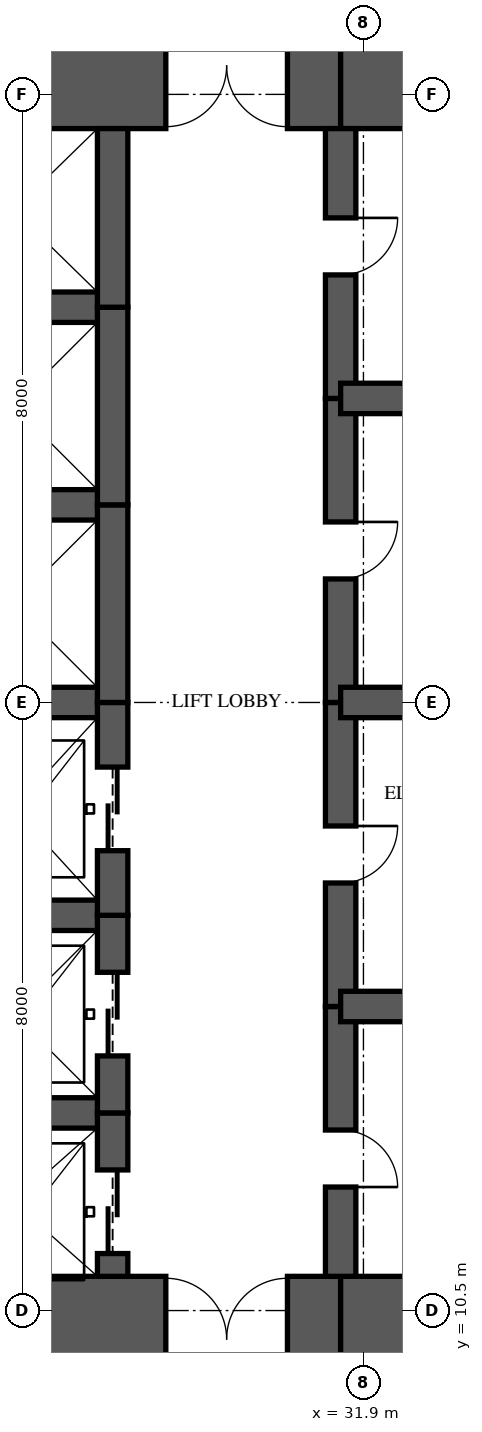
"""IFC4 building model, lengths in metres.
Left out: names, types, materials, properties, quantities, classifications, styles, units other than length and angle.
Written with IfcOpenShell. Run it as: python <this file> out.ifc"""

import sys

from ifc_helpers import new_model, si_unit, direction, frame, frame_2d, origin, place, context, subcontext, project, spatial, rectangle, extrude, element, fill, save


model = new_model("IFC4")
c1 = context("Model", 3, precision=1e-05, world=origin(), true_north=direction((0.0, 1.0)))
c2 = subcontext(c1, "Body", "Model", "MODEL_VIEW")
j1 = project(units=[si_unit("LENGTHUNIT", "METRE"), si_unit("PLANEANGLEUNIT", "RADIAN")], contexts=[c1])
p1 = place(None, origin())
s1 = spatial("IfcSite", under=j1, at=p1, CompositionType="ELEMENT")
p2 = place(p1, origin())
s2 = spatial("IfcBuilding", under=s1, at=p2, CompositionType="ELEMENT")
p3 = place(p2, frame((0.0, 0.0, 34.4)))
s3 = spatial("IfcBuildingStorey", under=s2, at=p3, CompositionType="ELEMENT", Elevation=34.4)
p4 = place(p3, frame((26.0, 10.125, 0.0), z_axis=(0.0, 0.0, 1.0), x_axis=(1.0, 0.0, 0.0)))
e1 = element("IfcWall", 1, at=p4, inside=s3, PredefinedType="SHEAR", context=c2, shape_type="SweptSolid", body=[
    extrude(rectangle(XDim=5.6, YDim=1.65, at=frame_2d((2.8, 0.0))), origin(), (0.0, 0.0, 1.0), 3.35),
])
p5 = place(p4, frame((3.3, 0.0, 0.0)))
e2 = element("IfcOpeningElement", 2, at=p5, cuts=e1, PredefinedType="OPENING", context=c2, shape_type="SweptSolid", body=[
    extrude(rectangle(XDim=1.6, YDim=2.1, at=frame_2d((0.8, 1.05))), frame((0.0, 0.835, 0.0), z_axis=(0.0, -1.0, 0.0), x_axis=(1.0, 0.0, 0.0)), (0.0, 0.0, 1.0), 1.67),
])
for number, where, z_axis, x_axis in (
    (3, (31.6, 10.125, 0.0), (0.0, 0.0, 1.0), (1.0, 0.0, 0.0)),
    (4, (35.9, 26.875, 0.0), (0.0, 0.0, 1.0), (-1.0, 0.0, 0.0)),
):
    element("IfcWall", number, at=place(p3, frame(where, z_axis=z_axis, x_axis=x_axis)), inside=s3, PredefinedType="SHEAR", context=c2, shape_type="SweptSolid", body=[
        extrude(rectangle(XDim=4.3, YDim=1.65, at=frame_2d((2.15, 0.0))), origin(), (0.0, 0.0, 1.0), 3.35),
    ])
p6 = place(p3, frame((31.6, 26.875, 0.0), z_axis=(0.0, 0.0, 1.0), x_axis=(-1.0, 0.0, 0.0)))
e5 = element("IfcWall", 5, at=p6, inside=s3, PredefinedType="SHEAR", context=c2, shape_type="SweptSolid", body=[
    extrude(rectangle(XDim=5.6, YDim=1.65, at=frame_2d((2.8, 0.0))), origin(), (0.0, 0.0, 1.0), 3.35),
])
p7 = place(p6, frame((0.7, 0.0, 0.0)))
e6 = element("IfcOpeningElement", 6, at=p7, cuts=e5, PredefinedType="OPENING", context=c2, shape_type="SweptSolid", body=[
    extrude(rectangle(XDim=1.6, YDim=2.1, at=frame_2d((0.8, 1.05))), frame((0.0, 0.835, 0.0), z_axis=(0.0, -1.0, 0.0), x_axis=(1.0, 0.0, 0.0)), (0.0, 0.0, 1.0), 1.67),
])
p8 = place(p3, frame((28.6, 10.95, 0.0), z_axis=(0.0, 0.0, 1.0), x_axis=(0.0, 1.0, 0.0)))
e7 = element("IfcWall", 7, at=p8, inside=s3, PredefinedType="SHEAR", context=c2, shape_type="SweptSolid", body=[
    extrude(rectangle(XDim=2.15, YDim=0.4, at=frame_2d((1.075, 0.0))), origin(), (0.0, 0.0, 1.0), 3.35),
])
p9 = place(p8, frame((0.3, 0.0, 0.0)))
e8 = element("IfcOpeningElement", 8, at=p9, cuts=e7, PredefinedType="OPENING", context=c2, shape_type="SweptSolid", body=[
    extrude(rectangle(XDim=1.1, YDim=2.1, at=frame_2d((0.55, 1.05))), frame((0.0, 0.21, 0.0), z_axis=(0.0, -1.0, 0.0), x_axis=(1.0, 0.0, 0.0)), (0.0, 0.0, 1.0), 0.42),
])
p10 = place(p3, frame((28.6, 13.1, 0.0), z_axis=(0.0, 0.0, 1.0), x_axis=(0.0, 1.0, 0.0)))
e9 = element("IfcWall", 9, at=p10, inside=s3, PredefinedType="SHEAR", context=c2, shape_type="SweptSolid", body=[
    extrude(rectangle(XDim=2.6, YDim=0.4, at=frame_2d((1.3, 0.0))), origin(), (0.0, 0.0, 1.0), 3.35),
])
p11 = place(p10, frame((0.75, 0.0, 0.0)))
e10 = element("IfcOpeningElement", 10, at=p11, cuts=e9, PredefinedType="OPENING", context=c2, shape_type="SweptSolid", body=[
    extrude(rectangle(XDim=1.1, YDim=2.1, at=frame_2d((0.55, 1.05))), frame((0.0, 0.21, 0.0), z_axis=(0.0, -1.0, 0.0), x_axis=(1.0, 0.0, 0.0)), (0.0, 0.0, 1.0), 0.42),
])
p12 = place(p3, frame((28.6, 15.7, 0.0), z_axis=(0.0, 0.0, 1.0), x_axis=(0.0, 1.0, 0.0)))
e11 = element("IfcWall", 11, at=p12, inside=s3, PredefinedType="SHEAR", context=c2, shape_type="SweptSolid", body=[
    extrude(rectangle(XDim=2.8, YDim=0.4, at=frame_2d((1.4, 0.0))), origin(), (0.0, 0.0, 1.0), 3.35),
])
p13 = place(p12, frame((0.85, 0.0, 0.0)))
e12 = element("IfcOpeningElement", 12, at=p13, cuts=e11, PredefinedType="OPENING", context=c2, shape_type="SweptSolid", body=[
    extrude(rectangle(XDim=1.1, YDim=2.1, at=frame_2d((0.55, 1.05))), frame((0.0, 0.21, 0.0), z_axis=(0.0, -1.0, 0.0), x_axis=(1.0, 0.0, 0.0)), (0.0, 0.0, 1.0), 0.42),
])
p14 = place(p3, frame((28.6, 18.5, 0.0), z_axis=(0.0, 0.0, 1.0), x_axis=(0.0, 1.0, 0.0)))
e13 = element("IfcWall", 13, at=p14, inside=s3, PredefinedType="SHEAR", context=c2, shape_type="SweptSolid", body=[
    extrude(rectangle(XDim=2.6, YDim=0.4, at=frame_2d((1.3, 0.0))), origin(), (0.0, 0.0, 1.0), 3.35),
])
p15 = place(p3, frame((28.6, 21.1, 0.0), z_axis=(0.0, 0.0, 1.0), x_axis=(0.0, 1.0, 0.0)))
e14 = element("IfcWall", 14, at=p15, inside=s3, PredefinedType="SHEAR", context=c2, shape_type="SweptSolid", body=[
    extrude(rectangle(XDim=2.6, YDim=0.4, at=frame_2d((1.3, 0.0))), origin(), (0.0, 0.0, 1.0), 3.35),
])
p16 = place(p3, frame((28.6, 23.7, 0.0), z_axis=(0.0, 0.0, 1.0), x_axis=(0.0, 1.0, 0.0)))
e15 = element("IfcWall", 15, at=p16, inside=s3, PredefinedType="SHEAR", context=c2, shape_type="SweptSolid", body=[
    extrude(rectangle(XDim=2.35, YDim=0.4, at=frame_2d((1.175, 0.0))), origin(), (0.0, 0.0, 1.0), 3.35),
])
p17 = place(p3, frame((31.6, 10.95, 0.0), z_axis=(0.0, 0.0, 1.0), x_axis=(0.0, 1.0, 0.0)))
e16 = element("IfcWall", 16, at=p17, inside=s3, PredefinedType="SHEAR", context=c2, shape_type="SweptSolid", body=[
    extrude(rectangle(XDim=3.55, YDim=0.4, at=frame_2d((1.775, 0.0))), origin(), (0.0, 0.0, 1.0), 3.35),
])
p18 = place(p17, frame((1.175, 0.0, 0.0)))
e17 = element("IfcOpeningElement", 17, at=p18, cuts=e16, PredefinedType="OPENING", context=c2, shape_type="SweptSolid", body=[
    extrude(rectangle(XDim=0.75, YDim=2.1, at=frame_2d((0.375, 1.05))), frame((0.0, 0.21, 0.0), z_axis=(0.0, -1.0, 0.0), x_axis=(1.0, 0.0, 0.0)), (0.0, 0.0, 1.0), 0.42),
])
p19 = place(p3, frame((31.6, 14.5, 0.0), z_axis=(0.0, 0.0, 1.0), x_axis=(0.0, 1.0, 0.0)))
e18 = element("IfcWall", 18, at=p19, inside=s3, PredefinedType="SHEAR", context=c2, shape_type="SweptSolid", body=[
    extrude(rectangle(XDim=4.0, YDim=0.4, at=frame_2d((2.0, 0.0))), origin(), (0.0, 0.0, 1.0), 3.35),
])
p20 = place(p19, frame((1.625, 0.0, 0.0)))
e19 = element("IfcOpeningElement", 19, at=p20, cuts=e18, PredefinedType="OPENING", context=c2, shape_type="SweptSolid", body=[
    extrude(rectangle(XDim=0.75, YDim=2.1, at=frame_2d((0.375, 1.05))), frame((0.0, 0.21, 0.0), z_axis=(0.0, -1.0, 0.0), x_axis=(1.0, 0.0, 0.0)), (0.0, 0.0, 1.0), 0.42),
])
p21 = place(p3, frame((31.6, 18.5, 0.0), z_axis=(0.0, 0.0, 1.0), x_axis=(0.0, 1.0, 0.0)))
e20 = element("IfcWall", 20, at=p21, inside=s3, PredefinedType="SHEAR", context=c2, shape_type="SweptSolid", body=[
    extrude(rectangle(XDim=4.0, YDim=0.4, at=frame_2d((2.0, 0.0))), origin(), (0.0, 0.0, 1.0), 3.35),
])
p22 = place(p21, frame((1.625, 0.0, 0.0)))
e21 = element("IfcOpeningElement", 21, at=p22, cuts=e20, PredefinedType="OPENING", context=c2, shape_type="SweptSolid", body=[
    extrude(rectangle(XDim=0.75, YDim=2.1, at=frame_2d((0.375, 1.05))), frame((0.0, 0.21, 0.0), z_axis=(0.0, -1.0, 0.0), x_axis=(1.0, 0.0, 0.0)), (0.0, 0.0, 1.0), 0.42),
])
p23 = place(p3, frame((31.6, 22.5, 0.0), z_axis=(0.0, 0.0, 1.0), x_axis=(0.0, 1.0, 0.0)))
e22 = element("IfcWall", 22, at=p23, inside=s3, PredefinedType="SHEAR", context=c2, shape_type="SweptSolid", body=[
    extrude(rectangle(XDim=3.55, YDim=0.4, at=frame_2d((1.775, 0.0))), origin(), (0.0, 0.0, 1.0), 3.35),
])
p24 = place(p23, frame((1.625, 0.0, 0.0)))
e23 = element("IfcOpeningElement", 23, at=p24, cuts=e22, PredefinedType="OPENING", context=c2, shape_type="SweptSolid", body=[
    extrude(rectangle(XDim=0.75, YDim=2.1, at=frame_2d((0.375, 1.05))), frame((0.0, 0.21, 0.0), z_axis=(0.0, -1.0, 0.0), x_axis=(1.0, 0.0, 0.0)), (0.0, 0.0, 1.0), 0.42),
])
for number, where, z_axis, x_axis in (
    (24, (26.0, 13.1, 0.0), (0.0, 0.0, 1.0), (1.0, 0.0, 0.0)),
    (25, (26.0, 15.7, 0.0), (0.0, 0.0, 1.0), (1.0, 0.0, 0.0)),
    (26, (26.0, 18.5, 0.0), (0.0, 0.0, 1.0), (1.0, 0.0, 0.0)),
    (27, (26.0, 21.1, 0.0), (0.0, 0.0, 1.0), (1.0, 0.0, 0.0)),
    (28, (26.0, 23.7, 0.0), (0.0, 0.0, 1.0), (1.0, 0.0, 0.0)),
):
    element("IfcWall", number, at=place(p3, frame(where, z_axis=z_axis, x_axis=x_axis)), inside=s3, PredefinedType="SHEAR", context=c2, shape_type="SweptSolid", body=[
        extrude(rectangle(XDim=2.6, YDim=0.4, at=frame_2d((1.3, 0.0))), origin(), (0.0, 0.0, 1.0), 3.35),
    ])
for number, where, z_axis, x_axis in (
    (29, (31.6, 14.5, 0.0), (0.0, 0.0, 1.0), (1.0, 0.0, 0.0)),
    (30, (31.6, 18.5, 0.0), (0.0, 0.0, 1.0), (1.0, 0.0, 0.0)),
    (31, (31.6, 22.5, 0.0), (0.0, 0.0, 1.0), (1.0, 0.0, 0.0)),
):
    element("IfcWall", number, at=place(p3, frame(where, z_axis=z_axis, x_axis=x_axis)), inside=s3, PredefinedType="SHEAR", context=c2, shape_type="SweptSolid", body=[
        extrude(rectangle(XDim=4.3, YDim=0.4, at=frame_2d((2.15, 0.0))), origin(), (0.0, 0.0, 1.0), 3.35),
    ])
p25 = place(p9, origin())
e32 = element("IfcDoor", 32, at=p25, inside=s3, OperationType="SLIDING_TO_LEFT", PredefinedType="DOOR", context=c2, shape_type="SweptSolid", body=[
    extrude(rectangle(XDim=1.1, YDim=2.1, at=frame_2d((0.55, 1.05))), frame((0.0, 0.025, 0.0), z_axis=(0.0, -1.0, 0.0), x_axis=(1.0, 0.0, 0.0)), (0.0, 0.0, 1.0), 0.05),
])
fill(e8, e32)
p26 = place(p11, origin())
e33 = element("IfcDoor", 33, at=p26, inside=s3, OperationType="SLIDING_TO_LEFT", PredefinedType="DOOR", context=c2, shape_type="SweptSolid", body=[
    extrude(rectangle(XDim=1.1, YDim=2.1, at=frame_2d((0.55, 1.05))), frame((0.0, 0.025, 0.0), z_axis=(0.0, -1.0, 0.0), x_axis=(1.0, 0.0, 0.0)), (0.0, 0.0, 1.0), 0.05),
])
fill(e10, e33)
p27 = place(p13, origin())
e34 = element("IfcDoor", 34, at=p27, inside=s3, OperationType="SLIDING_TO_LEFT", PredefinedType="DOOR", context=c2, shape_type="SweptSolid", body=[
    extrude(rectangle(XDim=1.1, YDim=2.1, at=frame_2d((0.55, 1.05))), frame((0.0, 0.025, 0.0), z_axis=(0.0, -1.0, 0.0), x_axis=(1.0, 0.0, 0.0)), (0.0, 0.0, 1.0), 0.05),
])
fill(e12, e34)
p28 = place(p5, origin())
e35 = element("IfcDoor", 35, at=p28, inside=s3, OperationType="DOUBLE_DOOR_SINGLE_SWING", PredefinedType="DOOR", context=c2, shape_type="SweptSolid", body=[
    extrude(rectangle(XDim=1.6, YDim=2.1, at=frame_2d((0.8, 1.05))), frame((0.0, 0.025, 0.0), z_axis=(0.0, -1.0, 0.0), x_axis=(1.0, 0.0, 0.0)), (0.0, 0.0, 1.0), 0.05),
])
fill(e2, e35)
p29 = place(p7, origin())
e36 = element("IfcDoor", 36, at=p29, inside=s3, OperationType="DOUBLE_DOOR_SINGLE_SWING", PredefinedType="DOOR", context=c2, shape_type="SweptSolid", body=[
    extrude(rectangle(XDim=1.6, YDim=2.1, at=frame_2d((0.8, 1.05))), frame((0.0, 0.025, 0.0), z_axis=(0.0, -1.0, 0.0), x_axis=(1.0, 0.0, 0.0)), (0.0, 0.0, 1.0), 0.05),
])
fill(e6, e36)
p30 = place(p18, frame((0.75, 0.0, 0.0), z_axis=(0.0, 0.0, 1.0), x_axis=(-1.0, 0.0, 0.0)))
e37 = element("IfcDoor", 37, at=p30, inside=s3, OperationType="SINGLE_SWING_RIGHT", PredefinedType="DOOR", context=c2, shape_type="SweptSolid", body=[
    extrude(rectangle(XDim=0.75, YDim=2.1, at=frame_2d((0.375, 1.05))), frame((0.0, 0.025, 0.0), z_axis=(0.0, -1.0, 0.0), x_axis=(1.0, 0.0, 0.0)), (0.0, 0.0, 1.0), 0.05),
])
fill(e17, e37)
p31 = place(p20, frame((0.75, 0.0, 0.0), z_axis=(0.0, 0.0, 1.0), x_axis=(-1.0, 0.0, 0.0)))
e38 = element("IfcDoor", 38, at=p31, inside=s3, OperationType="SINGLE_SWING_LEFT", PredefinedType="DOOR", context=c2, shape_type="SweptSolid", body=[
    extrude(rectangle(XDim=0.75, YDim=2.1, at=frame_2d((0.375, 1.05))), frame((0.0, 0.025, 0.0), z_axis=(0.0, -1.0, 0.0), x_axis=(1.0, 0.0, 0.0)), (0.0, 0.0, 1.0), 0.05),
])
fill(e19, e38)
p32 = place(p22, frame((0.75, 0.0, 0.0), z_axis=(0.0, 0.0, 1.0), x_axis=(-1.0, 0.0, 0.0)))
e39 = element("IfcDoor", 39, at=p32, inside=s3, OperationType="SINGLE_SWING_LEFT", PredefinedType="DOOR", context=c2, shape_type="SweptSolid", body=[
    extrude(rectangle(XDim=0.75, YDim=2.1, at=frame_2d((0.375, 1.05))), frame((0.0, 0.025, 0.0), z_axis=(0.0, -1.0, 0.0), x_axis=(1.0, 0.0, 0.0)), (0.0, 0.0, 1.0), 0.05),
])
fill(e21, e39)
p33 = place(p24, frame((0.75, 0.0, 0.0), z_axis=(0.0, 0.0, 1.0), x_axis=(-1.0, 0.0, 0.0)))
e40 = element("IfcDoor", 40, at=p33, inside=s3, OperationType="SINGLE_SWING_LEFT", PredefinedType="DOOR", context=c2, shape_type="SweptSolid", body=[
    extrude(rectangle(XDim=0.75, YDim=2.1, at=frame_2d((0.375, 1.05))), frame((0.0, 0.025, 0.0), z_axis=(0.0, -1.0, 0.0), x_axis=(1.0, 0.0, 0.0)), (0.0, 0.0, 1.0), 0.05),
])
fill(e23, e40)
save(model, sys.argv[1])
